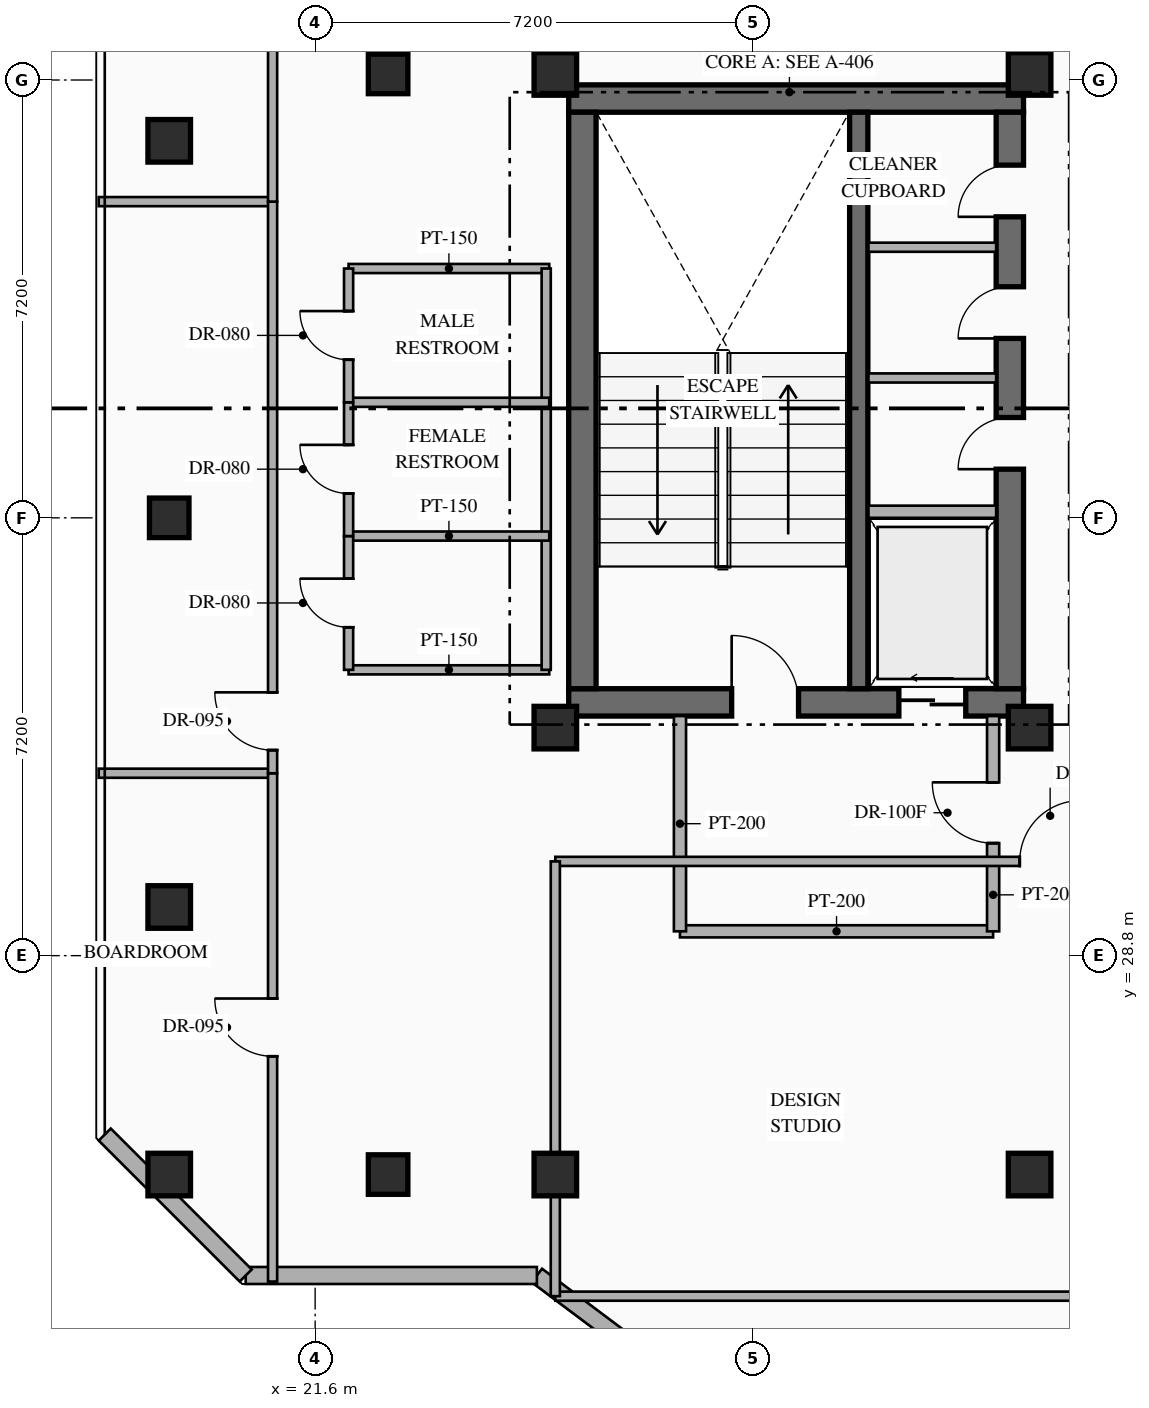
"""IFC4 building model, lengths in metres.
Left out: names, types, materials, properties, quantities, classifications, styles, units other than length and angle.
Written with IfcOpenShell. Run it as: python <this file> out.ifc"""

import sys

from ifc_helpers import new_model, si_unit, direction, frame, frame_2d, origin, origin_2d, place, context, subcontext, project, spatial, rectangle, hollow_rectangle, extrude, element, fill, save


model = new_model("IFC4")
c1 = context("Model", 3, precision=1e-05, world=origin(), true_north=direction((0.0, 1.0)))
c2 = subcontext(c1, "Body", "Model", "MODEL_VIEW")
j1 = project(units=[si_unit("LENGTHUNIT", "METRE"), si_unit("PLANEANGLEUNIT", "RADIAN")], contexts=[c1])
p1 = place(None, origin())
s1 = spatial("IfcSite", under=j1, at=p1, CompositionType="ELEMENT")
p2 = place(p1, origin())
s2 = spatial("IfcBuilding", under=s1, at=p2, CompositionType="ELEMENT")
p3 = place(p2, frame((0.0, 0.0, 216.75)))
s3 = spatial("IfcBuildingStorey", under=s2, at=p3, CompositionType="ELEMENT", Elevation=216.75)
p4 = place(p3, frame((25.77, 32.965, 0.0), z_axis=(0.0, 0.0, 1.0), x_axis=(1.0, 0.0, 0.0)))
e1 = element("IfcWall", 1, at=p4, inside=s3, PredefinedType="SHEAR", context=c2, shape_type="SweptSolid", body=[
    extrude(rectangle(XDim=7.48, YDim=0.45, at=frame_2d((3.74, 0.0))), origin(), (0.0, 0.0, 1.0), 3.6),
])
p5 = place(p4, frame((2.68, 0.0, 0.0)))
e2 = element("IfcOpeningElement", 2, at=p5, cuts=e1, PredefinedType="OPENING", context=c2, shape_type="SweptSolid", body=[
    extrude(rectangle(XDim=1.1, YDim=2.2, at=frame_2d((0.55, 1.1))), frame((0.0, 0.235, 0.0), z_axis=(0.0, -1.0, 0.0), x_axis=(1.0, 0.0, 0.0)), (0.0, 0.0, 1.0), 0.47),
])
p6 = place(p4, frame((5.43, 0.0, 0.0)))
e3 = element("IfcOpeningElement", 3, at=p6, cuts=e1, PredefinedType="OPENING", context=c2, shape_type="SweptSolid", body=[
    extrude(rectangle(XDim=1.1, YDim=2.15, at=frame_2d((0.55, 1.075))), frame((0.0, 0.235, 0.0), z_axis=(0.0, -1.0, 0.0), x_axis=(1.0, 0.0, 0.0)), (0.0, 0.0, 1.0), 0.47),
])
p7 = place(p3, frame((25.77, 42.895, 0.0), z_axis=(0.0, 0.0, 1.0), x_axis=(1.0, 0.0, 0.0)))
e4 = element("IfcWall", 4, at=p7, inside=s3, PredefinedType="SHEAR", context=c2, shape_type="SweptSolid", body=[
    extrude(rectangle(XDim=7.48, YDim=0.45, at=frame_2d((3.74, 0.0))), origin(), (0.0, 0.0, 1.0), 3.6),
])
p8 = place(p3, frame((25.995, 33.19, 0.0), z_axis=(0.0, 0.0, 1.0), x_axis=(0.0, 1.0, 0.0)))
e5 = element("IfcWall", 5, at=p8, inside=s3, PredefinedType="SHEAR", context=c2, shape_type="SweptSolid", body=[
    extrude(rectangle(XDim=9.48, YDim=0.45, at=frame_2d((4.74, 0.0))), origin(), (0.0, 0.0, 1.0), 3.6),
])
p9 = place(p3, frame((33.025, 33.19, 0.0), z_axis=(0.0, 0.0, 1.0), x_axis=(0.0, 1.0, 0.0)))
e6 = element("IfcWall", 6, at=p9, inside=s3, PredefinedType="SHEAR", context=c2, shape_type="SweptSolid", body=[
    extrude(rectangle(XDim=9.48, YDim=0.45, at=frame_2d((4.74, 0.0))), origin(), (0.0, 0.0, 1.0), 3.6),
])
p10 = place(p9, frame((3.61, 0.0, 0.0)))
e7 = element("IfcOpeningElement", 7, at=p10, cuts=e6, PredefinedType="OPENING", context=c2, shape_type="SweptSolid", body=[
    extrude(rectangle(XDim=0.85, YDim=2.08, at=frame_2d((0.425, 1.04))), frame((0.0, 0.235, 0.0), z_axis=(0.0, -1.0, 0.0), x_axis=(1.0, 0.0, 0.0)), (0.0, 0.0, 1.0), 0.47),
])
p11 = place(p9, frame((5.76, 0.0, 0.0)))
e8 = element("IfcOpeningElement", 8, at=p11, cuts=e6, PredefinedType="OPENING", context=c2, shape_type="SweptSolid", body=[
    extrude(rectangle(XDim=0.85, YDim=2.08, at=frame_2d((0.425, 1.04))), frame((0.0, 0.235, 0.0), z_axis=(0.0, -1.0, 0.0), x_axis=(1.0, 0.0, 0.0)), (0.0, 0.0, 1.0), 0.47),
])
p12 = place(p9, frame((7.76, 0.0, 0.0)))
e9 = element("IfcOpeningElement", 9, at=p12, cuts=e6, PredefinedType="OPENING", context=c2, shape_type="SweptSolid", body=[
    extrude(rectangle(XDim=0.85, YDim=2.08, at=frame_2d((0.425, 1.04))), frame((0.0, 0.235, 0.0), z_axis=(0.0, -1.0, 0.0), x_axis=(1.0, 0.0, 0.0)), (0.0, 0.0, 1.0), 0.47),
])
p13 = place(p3, frame((30.54, 33.19, 0.0), z_axis=(0.0, 0.0, 1.0), x_axis=(0.0, 1.0, 0.0)))
e10 = element("IfcWall", 10, at=p13, inside=s3, PredefinedType="SHEAR", context=c2, shape_type="SweptSolid", body=[
    extrude(rectangle(XDim=9.48, YDim=0.3, at=frame_2d((4.74, 0.0))), origin(), (0.0, 0.0, 1.0), 3.6),
])
for number, where, z_axis, x_axis in (
    (11, (25.55, 32.55, 0.0), (0.0, 0.0, 1.0), (1.0, 0.0, 0.0)),
    (12, (33.35, 32.55, 0.0), (0.0, 0.0, 1.0), (1.0, 0.0, 0.0)),
    (13, (25.55, 43.3, 0.0), (0.0, 0.0, 1.0), (1.0, 0.0, 0.0)),
    (14, (33.35, 43.3, 0.0), (0.0, 0.0, 1.0), (1.0, 0.0, 0.0)),
    (15, (25.55, 25.2, 0.0), (0.0, 0.0, 1.0), (1.0, 0.0, 0.0)),
    (16, (33.35, 25.2, 0.0), (0.0, 0.0, 1.0), (1.0, 0.0, 0.0)),
    (17, (19.2, 25.2, 0.0), (0.0, 0.0, 1.0), (1.0, 0.0, 0.0)),
    (18, (19.2, 29.6, 0.0), (0.0, 0.0, 1.0), (1.0, 0.0, 0.0)),
    (19, (19.2, 42.2, 0.0), (0.0, 0.0, 1.0), (1.0, 0.0, 0.0)),
):
    element("IfcColumn", number, at=place(p3, frame(where, z_axis=z_axis, x_axis=x_axis)), inside=s3, PredefinedType="COLUMN", context=c2, shape_type="SweptSolid", body=[
        extrude(hollow_rectangle(XDim=0.7, YDim=0.7, WallThickness=0.028, at=origin_2d()), origin(), (0.0, 0.0, 1.0), 3.6),
    ])
for number, where, z_axis, x_axis in (
    (20, (22.8, 25.2, 0.0), (0.0, 0.0, 1.0), (1.0, 0.0, 0.0)),
    (21, (22.8, 43.3, 0.0), (0.0, 0.0, 1.0), (1.0, 0.0, 0.0)),
    (22, (19.2, 36.0, 0.0), (0.0, 0.0, 1.0), (1.0, 0.0, 0.0)),
):
    element("IfcColumn", number, at=place(p3, frame(where, z_axis=z_axis, x_axis=x_axis)), inside=s3, PredefinedType="COLUMN", context=c2, shape_type="SweptSolid", body=[
        extrude(hollow_rectangle(XDim=0.65, YDim=0.65, WallThickness=0.025, at=origin_2d()), origin(), (0.0, 0.0, 1.0), 3.6),
    ])
p14 = place(p3, frame((44.918, 8.787, 0.0), z_axis=(0.0, 0.0, 1.0), x_axis=(-0.800004765927, 0.599993645378, 0.0)))
e23 = element("IfcWall", 23, at=p14, inside=s3, PredefinedType="STANDARD", context=c2, shape_type="SweptSolid", body=[
    extrude(rectangle(XDim=24.588, YDim=0.28, at=frame_2d((12.294, 0.0))), origin(), (0.0, 0.0, 1.0), 3.35),
])
p15 = place(p3, frame((25.247, 23.54, 0.0), z_axis=(0.0, 0.0, 1.0), x_axis=(-1.0, 0.0, 0.0)))
e24 = element("IfcWall", 24, at=p15, inside=s3, PredefinedType="STANDARD", context=c2, shape_type="SweptSolid", body=[
    extrude(rectangle(XDim=4.789, YDim=0.28, at=frame_2d((2.395, 0.0))), origin(), (0.0, 0.0, 1.0), 3.35),
])
p16 = place(p3, frame((20.458, 23.54, 0.0), z_axis=(0.0, 0.0, 1.0), x_axis=(-0.707144017911, 0.707069542501, 0.0)))
e25 = element("IfcWall", 25, at=p16, inside=s3, PredefinedType="STANDARD", context=c2, shape_type="SweptSolid", body=[
    extrude(rectangle(XDim=3.278, YDim=0.28, at=frame_2d((1.639, 0.0))), origin(), (0.0, 0.0, 1.0), 3.35),
])
p17 = place(p3, frame((30.7, 36.1, 0.0), z_axis=(0.0, 0.0, 1.0), x_axis=(1.0, 0.0, 0.0)))
e26 = element("IfcWall", 26, at=p17, inside=s3, PredefinedType="STANDARD", context=c2, shape_type="SweptSolid", body=[
    extrude(rectangle(XDim=2.1, YDim=0.2, at=frame_2d((1.05, 0.0))), origin(), (0.0, 0.0, 1.0), 3.35),
])
for number, where, z_axis, x_axis in (
    (27, (30.7, 38.3, 0.0), (0.0, 0.0, 1.0), (1.0, 0.0, 0.0)),
    (28, (30.7, 40.45, 0.0), (0.0, 0.0, 1.0), (1.0, 0.0, 0.0)),
):
    element("IfcWall", number, at=place(p3, frame(where, z_axis=z_axis, x_axis=x_axis)), inside=s3, PredefinedType="PARTITIONING", context=c2, shape_type="SweptSolid", body=[
        extrude(rectangle(XDim=2.1, YDim=0.15, at=frame_2d((1.05, 0.0))), origin(), (0.0, 0.0, 1.0), 3.35),
    ])
p18 = place(p3, frame((27.6, 29.2, 0.0), z_axis=(0.0, 0.0, 1.0), x_axis=(1.0, 0.0, 0.0)))
e29 = element("IfcWall", 29, at=p18, inside=s3, PredefinedType="STANDARD", context=c2, shape_type="SweptSolid", body=[
    extrude(rectangle(XDim=5.15, YDim=0.2, at=frame_2d((2.575, 0.0))), origin(), (0.0, 0.0, 1.0), 3.35),
])
p19 = place(p3, frame((27.6, 29.2, 0.0), z_axis=(0.0, 0.0, 1.0), x_axis=(0.0, 1.0, 0.0)))
e30 = element("IfcWall", 30, at=p19, inside=s3, PredefinedType="STANDARD", context=c2, shape_type="SweptSolid", body=[
    extrude(rectangle(XDim=3.54, YDim=0.2, at=frame_2d((1.77, 0.0))), origin(), (0.0, 0.0, 1.0), 3.35),
])
p20 = place(p3, frame((32.75, 29.2, 0.0), z_axis=(0.0, 0.0, 1.0), x_axis=(0.0, 1.0, 0.0)))
e31 = element("IfcWall", 31, at=p20, inside=s3, PredefinedType="STANDARD", context=c2, shape_type="SweptSolid", body=[
    extrude(rectangle(XDim=3.54, YDim=0.2, at=frame_2d((1.77, 0.0))), origin(), (0.0, 0.0, 1.0), 3.35),
])
p21 = place(p20, frame((1.45, 0.0, 0.0)))
e32 = element("IfcOpeningElement", 32, at=p21, cuts=e31, PredefinedType="OPENING", context=c2, shape_type="SweptSolid", body=[
    extrude(rectangle(XDim=1.0, YDim=2.2, at=frame_2d((0.5, 1.1))), frame((0.0, 0.11, 0.0), z_axis=(0.0, -1.0, 0.0), x_axis=(1.0, 0.0, 0.0)), (0.0, 0.0, 1.0), 0.22),
])
for number, where, z_axis, x_axis in (
    (33, (22.15, 33.5, 0.0), (0.0, 0.0, 1.0), (1.0, 0.0, 0.0)),
    (34, (22.15, 40.1, 0.0), (0.0, 0.0, 1.0), (1.0, 0.0, 0.0)),
):
    element("IfcWall", number, at=place(p3, frame(where, z_axis=z_axis, x_axis=x_axis)), inside=s3, PredefinedType="PARTITIONING", context=c2, shape_type="SweptSolid", body=[
        extrude(rectangle(XDim=3.3, YDim=0.15, at=frame_2d((1.65, 0.0))), origin(), (0.0, 0.0, 1.0), 3.35),
    ])
p22 = place(p3, frame((25.4, 33.5, 0.0), z_axis=(0.0, 0.0, 1.0), x_axis=(0.0, 1.0, 0.0)))
e35 = element("IfcWall", 35, at=p22, inside=s3, PredefinedType="PARTITIONING", context=c2, shape_type="SweptSolid", body=[
    extrude(rectangle(XDim=6.6, YDim=0.15, at=frame_2d((3.3, 0.0))), origin(), (0.0, 0.0, 1.0), 3.35),
])
for number, where, z_axis, x_axis in (
    (36, (22.15, 35.7, 0.0), (0.0, 0.0, 1.0), (1.0, 0.0, 0.0)),
    (37, (22.15, 37.9, 0.0), (0.0, 0.0, 1.0), (1.0, 0.0, 0.0)),
):
    element("IfcWall", number, at=place(p3, frame(where, z_axis=z_axis, x_axis=x_axis)), inside=s3, PredefinedType="PARTITIONING", context=c2, shape_type="SweptSolid", body=[
        extrude(rectangle(XDim=3.3, YDim=0.15, at=frame_2d((1.65, 0.0))), origin(), (0.0, 0.0, 1.0), 3.35),
    ])
p23 = place(p3, frame((22.15, 33.5, 0.0), z_axis=(0.0, 0.0, 1.0), x_axis=(0.0, 1.0, 0.0)))
e38 = element("IfcWall", 38, at=p23, inside=s3, PredefinedType="PARTITIONING", context=c2, shape_type="SweptSolid", body=[
    extrude(rectangle(XDim=2.2, YDim=0.15, at=frame_2d((1.1, 0.0))), origin(), (0.0, 0.0, 1.0), 3.35),
])
p24 = place(p23, frame((0.7, 0.0, 0.0)))
e39 = element("IfcOpeningElement", 39, at=p24, cuts=e38, PredefinedType="OPENING", context=c2, shape_type="SweptSolid", body=[
    extrude(rectangle(XDim=0.8, YDim=2.06, at=frame_2d((0.4, 1.03))), frame((0.0, 0.085, 0.0), z_axis=(0.0, -1.0, 0.0), x_axis=(1.0, 0.0, 0.0)), (0.0, 0.0, 1.0), 0.17),
])
p25 = place(p3, frame((22.15, 35.7, 0.0), z_axis=(0.0, 0.0, 1.0), x_axis=(0.0, 1.0, 0.0)))
e40 = element("IfcWall", 40, at=p25, inside=s3, PredefinedType="PARTITIONING", context=c2, shape_type="SweptSolid", body=[
    extrude(rectangle(XDim=2.2, YDim=0.15, at=frame_2d((1.1, 0.0))), origin(), (0.0, 0.0, 1.0), 3.35),
])
p26 = place(p25, frame((0.7, 0.0, 0.0)))
e41 = element("IfcOpeningElement", 41, at=p26, cuts=e40, PredefinedType="OPENING", context=c2, shape_type="SweptSolid", body=[
    extrude(rectangle(XDim=0.8, YDim=2.06, at=frame_2d((0.4, 1.03))), frame((0.0, 0.085, 0.0), z_axis=(0.0, -1.0, 0.0), x_axis=(1.0, 0.0, 0.0)), (0.0, 0.0, 1.0), 0.17),
])
p27 = place(p3, frame((22.15, 37.9, 0.0), z_axis=(0.0, 0.0, 1.0), x_axis=(0.0, 1.0, 0.0)))
e42 = element("IfcWall", 42, at=p27, inside=s3, PredefinedType="PARTITIONING", context=c2, shape_type="SweptSolid", body=[
    extrude(rectangle(XDim=2.2, YDim=0.15, at=frame_2d((1.1, 0.0))), origin(), (0.0, 0.0, 1.0), 3.35),
])
p28 = place(p27, frame((0.7, 0.0, 0.0)))
e43 = element("IfcOpeningElement", 43, at=p28, cuts=e42, PredefinedType="OPENING", context=c2, shape_type="SweptSolid", body=[
    extrude(rectangle(XDim=0.8, YDim=2.06, at=frame_2d((0.4, 1.03))), frame((0.0, 0.085, 0.0), z_axis=(0.0, -1.0, 0.0), x_axis=(1.0, 0.0, 0.0)), (0.0, 0.0, 1.0), 0.17),
])
p29 = place(p3, frame((25.55, 23.2, 0.0), z_axis=(0.0, 0.0, 1.0), x_axis=(1.0, 0.0, 0.0)))
e44 = element("IfcWall", 44, at=p29, inside=s3, PredefinedType="PARTITIONING", context=c2, shape_type="SweptSolid", body=[
    extrude(rectangle(XDim=9.4, YDim=0.15, at=frame_2d((4.7, 0.0))), origin(), (0.0, 0.0, 1.0), 3.35),
])
p30 = place(p3, frame((25.55, 30.35, 0.0), z_axis=(0.0, 0.0, 1.0), x_axis=(1.0, 0.0, 0.0)))
e45 = element("IfcWall", 45, at=p30, inside=s3, PredefinedType="PARTITIONING", context=c2, shape_type="SweptSolid", body=[
    extrude(rectangle(XDim=9.4, YDim=0.15, at=frame_2d((4.7, 0.0))), origin(), (0.0, 0.0, 1.0), 3.35),
])
p31 = place(p30, frame((7.638, 0.0, 0.0)))
e46 = element("IfcOpeningElement", 46, at=p31, cuts=e45, PredefinedType="OPENING", context=c2, shape_type="SweptSolid", body=[
    extrude(rectangle(XDim=1.0, YDim=2.15, at=frame_2d((0.5, 1.075))), frame((0.0, 0.085, 0.0), z_axis=(0.0, -1.0, 0.0), x_axis=(1.0, 0.0, 0.0)), (0.0, 0.0, 1.0), 0.17),
])
p32 = place(p3, frame((25.55, 23.2, 0.0), z_axis=(0.0, 0.0, 1.0), x_axis=(0.0, 1.0, 0.0)))
e47 = element("IfcWall", 47, at=p32, inside=s3, PredefinedType="PARTITIONING", context=c2, shape_type="SweptSolid", body=[
    extrude(rectangle(XDim=7.15, YDim=0.15, at=frame_2d((3.575, 0.0))), origin(), (0.0, 0.0, 1.0), 2.757),
])
p33 = place(p3, frame((18.04, 31.8, 0.0), z_axis=(0.0, 0.0, 1.0), x_axis=(1.0, 0.0, 0.0)))
e48 = element("IfcWall", 48, at=p33, inside=s3, PredefinedType="PARTITIONING", context=c2, shape_type="SweptSolid", body=[
    extrude(rectangle(XDim=2.86, YDim=0.15, at=frame_2d((1.43, 0.0))), origin(), (0.0, 0.0, 1.0), 3.35),
])
p34 = place(p3, frame((20.9, 23.44, 0.0), z_axis=(0.0, 0.0, 1.0), x_axis=(0.0, 1.0, 0.0)))
e49 = element("IfcWall", 49, at=p34, inside=s3, PredefinedType="PARTITIONING", context=c2, shape_type="SweptSolid", body=[
    extrude(rectangle(XDim=8.36, YDim=0.15, at=frame_2d((4.18, 0.0))), origin(), (0.0, 0.0, 1.0), 3.35),
])
p35 = place(p34, frame((3.705, 0.0, 0.0)))
e50 = element("IfcOpeningElement", 50, at=p35, cuts=e49, PredefinedType="OPENING", context=c2, shape_type="SweptSolid", body=[
    extrude(rectangle(XDim=0.95, YDim=2.15, at=frame_2d((0.475, 1.075))), frame((0.0, 0.085, 0.0), z_axis=(0.0, -1.0, 0.0), x_axis=(1.0, 0.0, 0.0)), (0.0, 0.0, 1.0), 0.17),
])
p36 = place(p3, frame((18.04, 41.2, 0.0), z_axis=(0.0, 0.0, 1.0), x_axis=(1.0, 0.0, 0.0)))
e51 = element("IfcWall", 51, at=p36, inside=s3, PredefinedType="PARTITIONING", context=c2, shape_type="SweptSolid", body=[
    extrude(rectangle(XDim=2.86, YDim=0.15, at=frame_2d((1.43, 0.0))), origin(), (0.0, 0.0, 1.0), 3.35),
])
p37 = place(p3, frame((20.9, 31.8, 0.0), z_axis=(0.0, 0.0, 1.0), x_axis=(0.0, 1.0, 0.0)))
e52 = element("IfcWall", 52, at=p37, inside=s3, PredefinedType="PARTITIONING", context=c2, shape_type="SweptSolid", body=[
    extrude(rectangle(XDim=9.4, YDim=0.15, at=frame_2d((4.7, 0.0))), origin(), (0.0, 0.0, 1.0), 3.35),
])
p38 = place(p37, frame((0.38, 0.0, 0.0)))
e53 = element("IfcOpeningElement", 53, at=p38, cuts=e52, PredefinedType="OPENING", context=c2, shape_type="SweptSolid", body=[
    extrude(rectangle(XDim=0.95, YDim=2.15, at=frame_2d((0.475, 1.075))), frame((0.0, 0.085, 0.0), z_axis=(0.0, -1.0, 0.0), x_axis=(1.0, 0.0, 0.0)), (0.0, 0.0, 1.0), 0.17),
])
p39 = place(p3, frame((20.9, 41.2, 0.0), z_axis=(0.0, 0.0, 1.0), x_axis=(0.0, 1.0, 0.0)))
e54 = element("IfcWall", 54, at=p39, inside=s3, PredefinedType="PARTITIONING", context=c2, shape_type="SweptSolid", body=[
    extrude(rectangle(XDim=9.16, YDim=0.15, at=frame_2d((4.58, 0.0))), origin(), (0.0, 0.0, 1.0), 3.35),
])
p40 = place(p39, frame((4.85, 0.0, 0.0)))
e55 = element("IfcOpeningElement", 55, at=p40, cuts=e54, PredefinedType="OPENING", context=c2, shape_type="SweptSolid", body=[
    extrude(rectangle(XDim=0.95, YDim=2.15, at=frame_2d((0.475, 1.075))), frame((0.0, 0.085, 0.0), z_axis=(0.0, -1.0, 0.0), x_axis=(1.0, 0.0, 0.0)), (0.0, 0.0, 1.0), 0.17),
])
p41 = place(p5, origin())
e56 = element("IfcDoor", 56, at=p41, inside=s3, OperationType="SINGLE_SWING_LEFT", PredefinedType="DOOR", context=c2, shape_type="SweptSolid", body=[
    extrude(rectangle(XDim=1.1, YDim=2.2, at=frame_2d((0.55, 1.1))), frame((0.0, 0.025, 0.0), z_axis=(0.0, -1.0, 0.0), x_axis=(1.0, 0.0, 0.0)), (0.0, 0.0, 1.0), 0.05),
])
fill(e2, e56)
p42 = place(p6, origin())
e57 = element("IfcDoor", 57, at=p42, inside=s3, OperationType="SLIDING_TO_LEFT", PredefinedType="USERDEFINED", context=c2, shape_type="SweptSolid", body=[
    extrude(rectangle(XDim=1.1, YDim=2.15, at=frame_2d((0.55, 1.075))), frame((0.0, 0.025, 0.0), z_axis=(0.0, -1.0, 0.0), x_axis=(1.0, 0.0, 0.0)), (0.0, 0.0, 1.0), 0.05),
])
fill(e3, e57)
p43 = place(p10, origin())
e58 = element("IfcDoor", 58, at=p43, inside=s3, OperationType="SINGLE_SWING_LEFT", PredefinedType="DOOR", context=c2, shape_type="SweptSolid", body=[
    extrude(rectangle(XDim=0.85, YDim=2.08, at=frame_2d((0.425, 1.04))), frame((0.0, 0.025, 0.0), z_axis=(0.0, -1.0, 0.0), x_axis=(1.0, 0.0, 0.0)), (0.0, 0.0, 1.0), 0.05),
])
fill(e7, e58)
p44 = place(p11, origin())
e59 = element("IfcDoor", 59, at=p44, inside=s3, OperationType="SINGLE_SWING_LEFT", PredefinedType="DOOR", context=c2, shape_type="SweptSolid", body=[
    extrude(rectangle(XDim=0.85, YDim=2.08, at=frame_2d((0.425, 1.04))), frame((0.0, 0.025, 0.0), z_axis=(0.0, -1.0, 0.0), x_axis=(1.0, 0.0, 0.0)), (0.0, 0.0, 1.0), 0.05),
])
fill(e8, e59)
p45 = place(p12, origin())
e60 = element("IfcDoor", 60, at=p45, inside=s3, OperationType="SINGLE_SWING_LEFT", PredefinedType="DOOR", context=c2, shape_type="SweptSolid", body=[
    extrude(rectangle(XDim=0.85, YDim=2.08, at=frame_2d((0.425, 1.04))), frame((0.0, 0.025, 0.0), z_axis=(0.0, -1.0, 0.0), x_axis=(1.0, 0.0, 0.0)), (0.0, 0.0, 1.0), 0.05),
])
fill(e9, e60)
p46 = place(p21, origin())
e61 = element("IfcDoor", 61, at=p46, inside=s3, OperationType="SINGLE_SWING_RIGHT", PredefinedType="DOOR", context=c2, shape_type="SweptSolid", body=[
    extrude(rectangle(XDim=1.0, YDim=2.2, at=frame_2d((0.5, 1.1))), frame((0.0, 0.025, 0.0), z_axis=(0.0, -1.0, 0.0), x_axis=(1.0, 0.0, 0.0)), (0.0, 0.0, 1.0), 0.05),
])
fill(e32, e61)
p47 = place(p24, origin())
e62 = element("IfcDoor", 62, at=p47, inside=s3, OperationType="SINGLE_SWING_RIGHT", PredefinedType="DOOR", context=c2, shape_type="SweptSolid", body=[
    extrude(rectangle(XDim=0.8, YDim=2.06, at=frame_2d((0.4, 1.03))), frame((0.0, 0.025, 0.0), z_axis=(0.0, -1.0, 0.0), x_axis=(1.0, 0.0, 0.0)), (0.0, 0.0, 1.0), 0.05),
])
fill(e39, e62)
p48 = place(p26, origin())
e63 = element("IfcDoor", 63, at=p48, inside=s3, OperationType="SINGLE_SWING_RIGHT", PredefinedType="DOOR", context=c2, shape_type="SweptSolid", body=[
    extrude(rectangle(XDim=0.8, YDim=2.06, at=frame_2d((0.4, 1.03))), frame((0.0, 0.025, 0.0), z_axis=(0.0, -1.0, 0.0), x_axis=(1.0, 0.0, 0.0)), (0.0, 0.0, 1.0), 0.05),
])
fill(e41, e63)
p49 = place(p28, origin())
e64 = element("IfcDoor", 64, at=p49, inside=s3, OperationType="SINGLE_SWING_RIGHT", PredefinedType="DOOR", context=c2, shape_type="SweptSolid", body=[
    extrude(rectangle(XDim=0.8, YDim=2.06, at=frame_2d((0.4, 1.03))), frame((0.0, 0.025, 0.0), z_axis=(0.0, -1.0, 0.0), x_axis=(1.0, 0.0, 0.0)), (0.0, 0.0, 1.0), 0.05),
])
fill(e43, e64)
p50 = place(p31, origin())
e65 = element("IfcDoor", 65, at=p50, inside=s3, OperationType="SINGLE_SWING_RIGHT", PredefinedType="DOOR", context=c2, shape_type="SweptSolid", body=[
    extrude(rectangle(XDim=1.0, YDim=2.15, at=frame_2d((0.5, 1.075))), frame((0.0, 0.025, 0.0), z_axis=(0.0, -1.0, 0.0), x_axis=(1.0, 0.0, 0.0)), (0.0, 0.0, 1.0), 0.05),
])
fill(e46, e65)
p51 = place(p35, origin())
e66 = element("IfcDoor", 66, at=p51, inside=s3, OperationType="SINGLE_SWING_RIGHT", PredefinedType="DOOR", context=c2, shape_type="SweptSolid", body=[
    extrude(rectangle(XDim=0.95, YDim=2.15, at=frame_2d((0.475, 1.075))), frame((0.0, 0.025, 0.0), z_axis=(0.0, -1.0, 0.0), x_axis=(1.0, 0.0, 0.0)), (0.0, 0.0, 1.0), 0.05),
])
fill(e50, e66)
p52 = place(p38, origin())
e67 = element("IfcDoor", 67, at=p52, inside=s3, OperationType="SINGLE_SWING_RIGHT", PredefinedType="DOOR", context=c2, shape_type="SweptSolid", body=[
    extrude(rectangle(XDim=0.95, YDim=2.15, at=frame_2d((0.475, 1.075))), frame((0.0, 0.025, 0.0), z_axis=(0.0, -1.0, 0.0), x_axis=(1.0, 0.0, 0.0)), (0.0, 0.0, 1.0), 0.05),
])
fill(e53, e67)
save(model, sys.argv[1])
